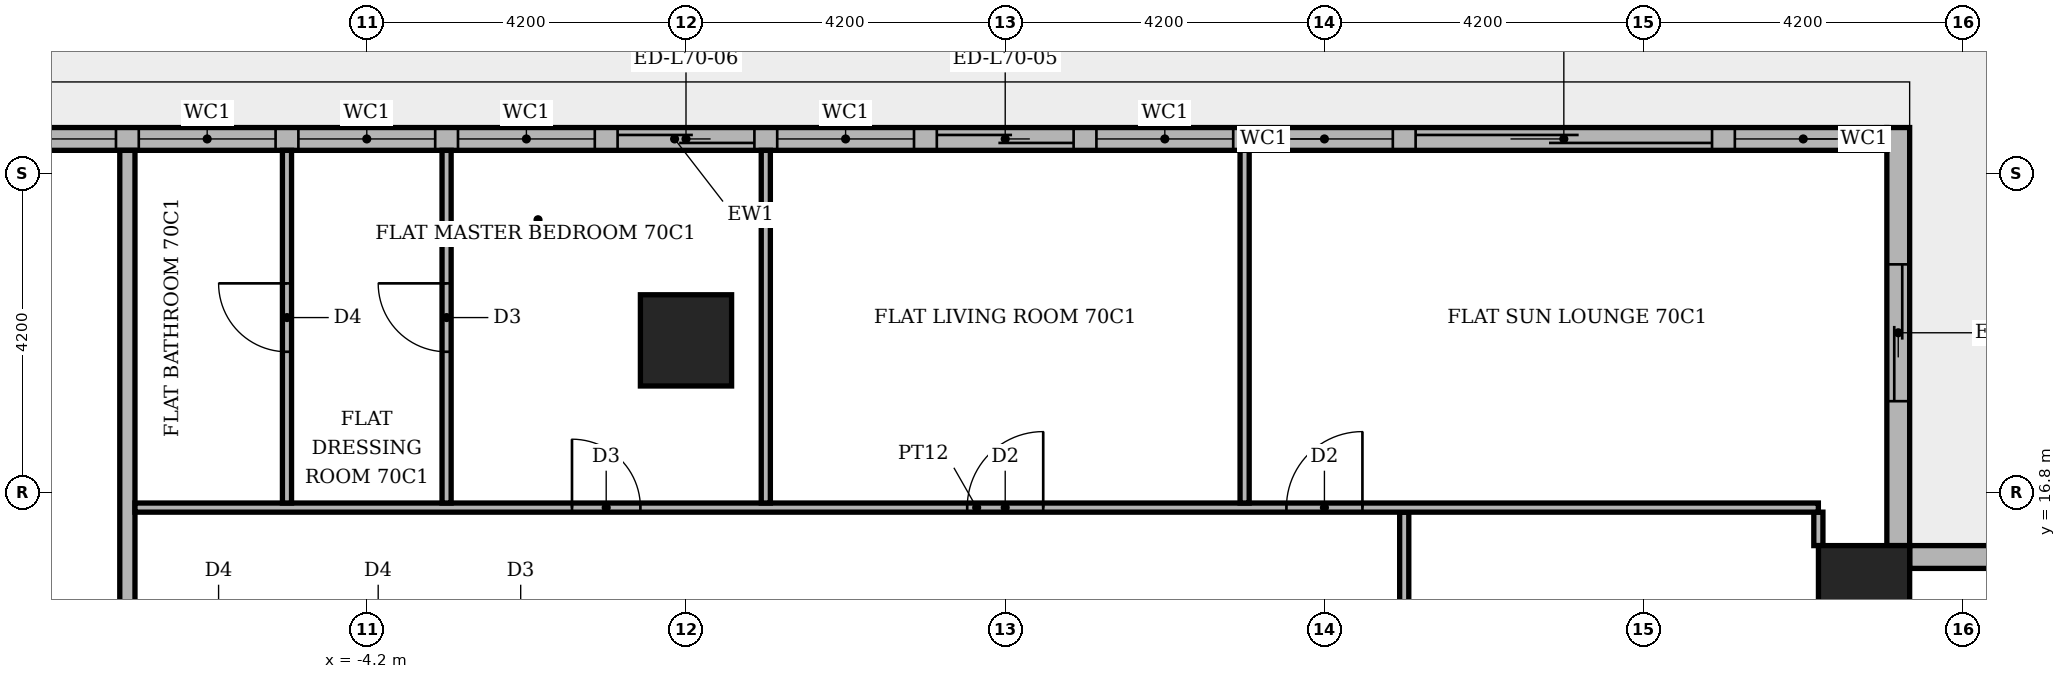
"""IFC4 building model, lengths in metres.
Left out: names, types, materials, properties, quantities, classifications, styles, units other than length and angle.
Written with IfcOpenShell. Run it as: python <this file> out.ifc"""

import sys

from ifc_helpers import new_model, si_unit, direction, frame, frame_2d, origin, origin_2d, place, context, subcontext, project, spatial, rectangle, extrude, element, fill, save


model = new_model("IFC4")
c1 = context("Model", 3, precision=1e-05, world=origin(), true_north=direction((0.0, 1.0)))
c2 = subcontext(c1, "Body", "Model", "MODEL_VIEW")
j1 = project(units=[si_unit("LENGTHUNIT", "METRE"), si_unit("PLANEANGLEUNIT", "RADIAN")], contexts=[c1])
p1 = place(None, origin())
s1 = spatial("IfcSite", under=j1, at=p1, CompositionType="ELEMENT")
p2 = place(p1, origin())
s2 = spatial("IfcBuilding", under=s1, at=p2, CompositionType="ELEMENT")
p3 = place(p2, frame((0.0, 0.0, 292.8)))
s3 = spatial("IfcBuildingStorey", under=s2, at=p3, CompositionType="ELEMENT", Elevation=292.8)
for number, where, z_axis, x_axis in (
    (1, (15.5, 15.5, -0.35), (0.0, 0.0, 1.0), (1.0, 0.0, 0.0)),
    (2, (0.0, 18.8, -0.35), (0.0, 0.0, 1.0), (1.0, 0.0, 0.0)),
):
    element("IfcColumn", number, at=place(p3, frame(where, z_axis=z_axis, x_axis=x_axis)), inside=s3, PredefinedType="COLUMN", context=c2, shape_type="SweptSolid", body=[
        extrude(rectangle(XDim=1.2, YDim=1.2, at=origin_2d()), origin(), (0.0, 0.0, 1.0), 4.25),
    ])
p4 = place(p3, frame((21.3, 15.95, 0.0), z_axis=(0.0, 0.0, 1.0), x_axis=(-1.0, 0.0, 0.0)))
e3 = element("IfcWall", 3, at=p4, inside=s3, PredefinedType="STANDARD", context=c2, shape_type="SweptSolid", body=[
    extrude(rectangle(XDim=5.2, YDim=0.3, at=frame_2d((2.6, 0.0))), origin(), (0.0, 0.0, 1.0), 3.55),
])
p5 = place(p4, frame((1.5, 0.0, 0.6)))
e4 = element("IfcOpeningElement", 4, at=p5, cuts=e3, PredefinedType="OPENING", context=c2, shape_type="SweptSolid", body=[
    extrude(rectangle(XDim=1.8, YDim=2.4, at=frame_2d((0.9, 1.2))), frame((0.0, 0.16, 0.0), z_axis=(0.0, -1.0, 0.0), x_axis=(1.0, 0.0, 0.0)), (0.0, 0.0, 1.0), 0.32),
])
p6 = place(p3, frame((15.95, 16.1, 0.0), z_axis=(0.0, 0.0, 1.0), x_axis=(0.0, 1.0, 0.0)))
e5 = element("IfcWall", 5, at=p6, inside=s3, PredefinedType="STANDARD", context=c2, shape_type="SweptSolid", body=[
    extrude(rectangle(XDim=5.5, YDim=0.3, at=frame_2d((2.75, 0.0))), origin(), (0.0, 0.0, 1.0), 3.55),
])
p7 = place(p6, frame((1.9, 0.0, 0.0)))
e6 = element("IfcOpeningElement", 6, at=p7, cuts=e5, PredefinedType="OPENING", context=c2, shape_type="SweptSolid", body=[
    extrude(rectangle(XDim=1.8, YDim=2.4, at=frame_2d((0.9, 1.2))), frame((0.0, 0.16, 0.0), z_axis=(0.0, -1.0, 0.0), x_axis=(1.0, 0.0, 0.0)), (0.0, 0.0, 1.0), 0.32),
])
p8 = place(p3, frame((15.8, 21.45, 0.0), z_axis=(0.0, 0.0, 1.0), x_axis=(-1.0, 0.0, 0.0)))
e7 = element("IfcWall", 7, at=p8, inside=s3, PredefinedType="STANDARD", context=c2, shape_type="SweptSolid", body=[
    extrude(rectangle(XDim=31.9, YDim=0.3, at=frame_2d((15.95, 0.0))), origin(), (0.0, 0.0, 1.0), 3.55),
])
p9 = place(p8, frame((0.2, 0.0, 0.6)))
e8 = element("IfcOpeningElement", 8, at=p9, cuts=e7, PredefinedType="OPENING", context=c2, shape_type="SweptSolid", body=[
    extrude(rectangle(XDim=1.8, YDim=2.4, at=frame_2d((0.9, 1.2))), frame((0.0, 0.16, 0.0), z_axis=(0.0, -1.0, 0.0), x_axis=(1.0, 0.0, 0.0)), (0.0, 0.0, 1.0), 0.32),
])
p10 = place(p8, frame((2.3, 0.0, 0.0)))
e9 = element("IfcOpeningElement", 9, at=p10, cuts=e7, PredefinedType="OPENING", context=c2, shape_type="SweptSolid", body=[
    extrude(rectangle(XDim=3.9, YDim=2.4, at=frame_2d((1.95, 1.2))), frame((0.0, 0.16, 0.0), z_axis=(0.0, -1.0, 0.0), x_axis=(1.0, 0.0, 0.0)), (0.0, 0.0, 1.0), 0.32),
])
p11 = place(p8, frame((6.5, 0.0, 0.6)))
e10 = element("IfcOpeningElement", 10, at=p11, cuts=e7, PredefinedType="OPENING", context=c2, shape_type="SweptSolid", body=[
    extrude(rectangle(XDim=1.8, YDim=2.4, at=frame_2d((0.9, 1.2))), frame((0.0, 0.16, 0.0), z_axis=(0.0, -1.0, 0.0), x_axis=(1.0, 0.0, 0.0)), (0.0, 0.0, 1.0), 0.32),
])
p12 = place(p8, frame((8.6, 0.0, 0.6)))
e11 = element("IfcOpeningElement", 11, at=p12, cuts=e7, PredefinedType="OPENING", context=c2, shape_type="SweptSolid", body=[
    extrude(rectangle(XDim=1.8, YDim=2.4, at=frame_2d((0.9, 1.2))), frame((0.0, 0.16, 0.0), z_axis=(0.0, -1.0, 0.0), x_axis=(1.0, 0.0, 0.0)), (0.0, 0.0, 1.0), 0.32),
])
p13 = place(p8, frame((10.7, 0.0, 0.0)))
e12 = element("IfcOpeningElement", 12, at=p13, cuts=e7, PredefinedType="OPENING", context=c2, shape_type="SweptSolid", body=[
    extrude(rectangle(XDim=1.8, YDim=2.4, at=frame_2d((0.9, 1.2))), frame((0.0, 0.16, 0.0), z_axis=(0.0, -1.0, 0.0), x_axis=(1.0, 0.0, 0.0)), (0.0, 0.0, 1.0), 0.32),
])
p14 = place(p8, frame((12.8, 0.0, 0.6)))
e13 = element("IfcOpeningElement", 13, at=p14, cuts=e7, PredefinedType="OPENING", context=c2, shape_type="SweptSolid", body=[
    extrude(rectangle(XDim=1.8, YDim=2.4, at=frame_2d((0.9, 1.2))), frame((0.0, 0.16, 0.0), z_axis=(0.0, -1.0, 0.0), x_axis=(1.0, 0.0, 0.0)), (0.0, 0.0, 1.0), 0.32),
])
p15 = place(p8, frame((14.9, 0.0, 0.0)))
e14 = element("IfcOpeningElement", 14, at=p15, cuts=e7, PredefinedType="OPENING", context=c2, shape_type="SweptSolid", body=[
    extrude(rectangle(XDim=1.8, YDim=2.4, at=frame_2d((0.9, 1.2))), frame((0.0, 0.16, 0.0), z_axis=(0.0, -1.0, 0.0), x_axis=(1.0, 0.0, 0.0)), (0.0, 0.0, 1.0), 0.32),
])
p16 = place(p8, frame((17.0, 0.0, 0.6)))
e15 = element("IfcOpeningElement", 15, at=p16, cuts=e7, PredefinedType="OPENING", context=c2, shape_type="SweptSolid", body=[
    extrude(rectangle(XDim=1.8, YDim=2.4, at=frame_2d((0.9, 1.2))), frame((0.0, 0.16, 0.0), z_axis=(0.0, -1.0, 0.0), x_axis=(1.0, 0.0, 0.0)), (0.0, 0.0, 1.0), 0.32),
])
p17 = place(p8, frame((19.1, 0.0, 0.6)))
e16 = element("IfcOpeningElement", 16, at=p17, cuts=e7, PredefinedType="OPENING", context=c2, shape_type="SweptSolid", body=[
    extrude(rectangle(XDim=1.8, YDim=2.4, at=frame_2d((0.9, 1.2))), frame((0.0, 0.16, 0.0), z_axis=(0.0, -1.0, 0.0), x_axis=(1.0, 0.0, 0.0)), (0.0, 0.0, 1.0), 0.32),
])
p18 = place(p8, frame((21.2, 0.0, 0.6)))
e17 = element("IfcOpeningElement", 17, at=p18, cuts=e7, PredefinedType="OPENING", context=c2, shape_type="SweptSolid", body=[
    extrude(rectangle(XDim=1.8, YDim=2.4, at=frame_2d((0.9, 1.2))), frame((0.0, 0.16, 0.0), z_axis=(0.0, -1.0, 0.0), x_axis=(1.0, 0.0, 0.0)), (0.0, 0.0, 1.0), 0.32),
])
p19 = place(p8, frame((23.3, 0.0, 0.6)))
e18 = element("IfcOpeningElement", 18, at=p19, cuts=e7, PredefinedType="OPENING", context=c2, shape_type="SweptSolid", body=[
    extrude(rectangle(XDim=6.0, YDim=2.4, at=frame_2d((3.0, 1.2))), frame((0.0, 0.16, 0.0), z_axis=(0.0, -1.0, 0.0), x_axis=(1.0, 0.0, 0.0)), (0.0, 0.0, 1.0), 0.32),
])
p20 = place(p8, frame((29.6, 0.0, 0.6)))
e19 = element("IfcOpeningElement", 19, at=p20, cuts=e7, PredefinedType="OPENING", context=c2, shape_type="SweptSolid", body=[
    extrude(rectangle(XDim=1.8, YDim=2.4, at=frame_2d((0.9, 1.2))), frame((0.0, 0.16, 0.0), z_axis=(0.0, -1.0, 0.0), x_axis=(1.0, 0.0, 0.0)), (0.0, 0.0, 1.0), 0.32),
])
p21 = place(p3, frame((-7.35, 7.45, 0.0), z_axis=(0.0, 0.0, 1.0), x_axis=(0.0, 1.0, 0.0)))
e20 = element("IfcWall", 20, at=p21, inside=s3, PredefinedType="PARTITIONING", context=c2, shape_type="SweptSolid", body=[
    extrude(rectangle(XDim=13.85, YDim=0.2, at=frame_2d((6.925, 0.0))), origin(), (0.0, 0.0, 1.0), 3.55),
])
p22 = place(p3, frame((9.45, 7.45, 0.0), z_axis=(0.0, 0.0, 1.0), x_axis=(0.0, 1.0, 0.0)))
e21 = element("IfcWall", 21, at=p22, inside=s3, PredefinedType="PARTITIONING", context=c2, shape_type="SweptSolid", body=[
    extrude(rectangle(XDim=9.09, YDim=0.12, at=frame_2d((4.545, 0.0))), origin(), (0.0, 0.0, 1.0), 3.55),
])
p23 = place(p22, frame((4.075, 0.0, 0.0)))
e22 = element("IfcOpeningElement", 22, at=p23, cuts=e21, PredefinedType="OPENING", context=c2, shape_type="SweptSolid", body=[
    extrude(rectangle(XDim=0.9, YDim=2.1, at=frame_2d((0.45, 1.05))), frame((0.0, 0.07, 0.0), z_axis=(0.0, -1.0, 0.0), x_axis=(1.0, 0.0, 0.0)), (0.0, 0.0, 1.0), 0.14),
])
p24 = place(p3, frame((14.899, 16.1, 0.0), z_axis=(0.0, 0.0, 1.0), x_axis=(0.0, 1.0, 0.0)))
e23 = element("IfcWall", 23, at=p24, inside=s3, PredefinedType="PARTITIONING", context=c2, shape_type="SweptSolid", body=[
    extrude(rectangle(XDim=0.44, YDim=0.12, at=frame_2d((0.22, 0.0))), origin(), (0.0, 0.0, 1.0), 3.55),
])
p25 = place(p3, frame((-7.25, 16.6, 0.0), z_axis=(0.0, 0.0, 1.0), x_axis=(1.0, 0.0, 0.0)))
e24 = element("IfcWall", 24, at=p25, inside=s3, PredefinedType="PARTITIONING", context=c2, shape_type="SweptSolid", body=[
    extrude(rectangle(XDim=22.149, YDim=0.12, at=frame_2d((11.074, 0.0))), origin(), (0.0, 0.0, 1.0), 3.55),
])
p26 = place(p25, frame((15.15, 0.0, 0.0)))
e25 = element("IfcOpeningElement", 25, at=p26, cuts=e24, PredefinedType="OPENING", context=c2, shape_type="SweptSolid", body=[
    extrude(rectangle(XDim=1.0, YDim=2.1, at=frame_2d((0.5, 1.05))), frame((0.0, 0.07, 0.0), z_axis=(0.0, -1.0, 0.0), x_axis=(1.0, 0.0, 0.0)), (0.0, 0.0, 1.0), 0.14),
])
p27 = place(p25, frame((10.95, 0.0, 0.0)))
e26 = element("IfcOpeningElement", 26, at=p27, cuts=e24, PredefinedType="OPENING", context=c2, shape_type="SweptSolid", body=[
    extrude(rectangle(XDim=1.0, YDim=2.1, at=frame_2d((0.5, 1.05))), frame((0.0, 0.07, 0.0), z_axis=(0.0, -1.0, 0.0), x_axis=(1.0, 0.0, 0.0)), (0.0, 0.0, 1.0), 0.14),
])
p28 = place(p25, frame((5.75, 0.0, 0.0)))
e27 = element("IfcOpeningElement", 27, at=p28, cuts=e24, PredefinedType="OPENING", context=c2, shape_type="SweptSolid", body=[
    extrude(rectangle(XDim=0.9, YDim=2.1, at=frame_2d((0.45, 1.05))), frame((0.0, 0.07, 0.0), z_axis=(0.0, -1.0, 0.0), x_axis=(1.0, 0.0, 0.0)), (0.0, 0.0, 1.0), 0.14),
])
p29 = place(p3, frame((-5.25, 16.66, 0.0), z_axis=(0.0, 0.0, 1.0), x_axis=(0.0, 1.0, 0.0)))
e28 = element("IfcWall", 28, at=p29, inside=s3, PredefinedType="PARTITIONING", context=c2, shape_type="SweptSolid", body=[
    extrude(rectangle(XDim=4.64, YDim=0.12, at=frame_2d((2.32, 0.0))), origin(), (0.0, 0.0, 1.0), 3.55),
])
p30 = place(p29, frame((1.99, 0.0, 0.0)))
e29 = element("IfcOpeningElement", 29, at=p30, cuts=e28, PredefinedType="OPENING", context=c2, shape_type="SweptSolid", body=[
    extrude(rectangle(XDim=0.9, YDim=2.1, at=frame_2d((0.45, 1.05))), frame((0.0, 0.07, 0.0), z_axis=(0.0, -1.0, 0.0), x_axis=(1.0, 0.0, 0.0)), (0.0, 0.0, 1.0), 0.14),
])
p31 = place(p3, frame((-3.15, 16.66, 0.0), z_axis=(0.0, 0.0, 1.0), x_axis=(0.0, 1.0, 0.0)))
e30 = element("IfcWall", 30, at=p31, inside=s3, PredefinedType="PARTITIONING", context=c2, shape_type="SweptSolid", body=[
    extrude(rectangle(XDim=4.64, YDim=0.12, at=frame_2d((2.32, 0.0))), origin(), (0.0, 0.0, 1.0), 3.55),
])
p32 = place(p31, frame((1.99, 0.0, 0.0)))
e31 = element("IfcOpeningElement", 31, at=p32, cuts=e30, PredefinedType="OPENING", context=c2, shape_type="SweptSolid", body=[
    extrude(rectangle(XDim=0.9, YDim=2.1, at=frame_2d((0.45, 1.05))), frame((0.0, 0.07, 0.0), z_axis=(0.0, -1.0, 0.0), x_axis=(1.0, 0.0, 0.0)), (0.0, 0.0, 1.0), 0.14),
])
for number, where, z_axis, x_axis in (
    (32, (1.05, 16.66, 0.0), (0.0, 0.0, 1.0), (0.0, 1.0, 0.0)),
    (33, (7.35, 16.66, 0.0), (0.0, 0.0, 1.0), (0.0, 1.0, 0.0)),
):
    element("IfcWall", number, at=place(p3, frame(where, z_axis=z_axis, x_axis=x_axis)), inside=s3, PredefinedType="PARTITIONING", context=c2, shape_type="SweptSolid", body=[
        extrude(rectangle(XDim=4.64, YDim=0.12, at=frame_2d((2.32, 0.0))), origin(), (0.0, 0.0, 1.0), 3.55),
    ])
p33 = place(p7, origin())
e34 = element("IfcDoor", 34, at=p33, inside=s3, OperationType="SLIDING_TO_LEFT", PredefinedType="DOOR", context=c2, shape_type="SweptSolid", body=[
    extrude(rectangle(XDim=1.8, YDim=2.4, at=frame_2d((0.9, 1.2))), frame((0.0, 0.025, 0.0), z_axis=(0.0, -1.0, 0.0), x_axis=(1.0, 0.0, 0.0)), (0.0, 0.0, 1.0), 0.05),
])
fill(e6, e34)
p34 = place(p9, origin())
e35 = element("IfcWindow", 35, at=p34, inside=s3, PartitioningType="SINGLE_PANEL", PredefinedType="WINDOW", context=c2, shape_type="SweptSolid", body=[
    extrude(rectangle(XDim=1.8, YDim=2.4, at=frame_2d((0.9, 1.2))), frame((0.0, 0.03, 0.0), z_axis=(0.0, -1.0, 0.0), x_axis=(1.0, 0.0, 0.0)), (0.0, 0.0, 1.0), 0.06),
])
fill(e8, e35)
p35 = place(p10, origin())
e36 = element("IfcDoor", 36, at=p35, inside=s3, OperationType="SLIDING_TO_RIGHT", PredefinedType="DOOR", context=c2, shape_type="SweptSolid", body=[
    extrude(rectangle(XDim=3.9, YDim=2.4, at=frame_2d((1.95, 1.2))), frame((0.0, 0.025, 0.0), z_axis=(0.0, -1.0, 0.0), x_axis=(1.0, 0.0, 0.0)), (0.0, 0.0, 1.0), 0.05),
])
fill(e9, e36)
p36 = place(p11, origin())
e37 = element("IfcWindow", 37, at=p36, inside=s3, PartitioningType="SINGLE_PANEL", PredefinedType="WINDOW", context=c2, shape_type="SweptSolid", body=[
    extrude(rectangle(XDim=1.8, YDim=2.4, at=frame_2d((0.9, 1.2))), frame((0.0, 0.03, 0.0), z_axis=(0.0, -1.0, 0.0), x_axis=(1.0, 0.0, 0.0)), (0.0, 0.0, 1.0), 0.06),
])
fill(e10, e37)
p37 = place(p12, origin())
e38 = element("IfcWindow", 38, at=p37, inside=s3, PartitioningType="SINGLE_PANEL", PredefinedType="WINDOW", context=c2, shape_type="SweptSolid", body=[
    extrude(rectangle(XDim=1.8, YDim=2.4, at=frame_2d((0.9, 1.2))), frame((0.0, 0.03, 0.0), z_axis=(0.0, -1.0, 0.0), x_axis=(1.0, 0.0, 0.0)), (0.0, 0.0, 1.0), 0.06),
])
fill(e11, e38)
p38 = place(p13, origin())
e39 = element("IfcDoor", 39, at=p38, inside=s3, OperationType="SLIDING_TO_LEFT", PredefinedType="DOOR", context=c2, shape_type="SweptSolid", body=[
    extrude(rectangle(XDim=1.8, YDim=2.4, at=frame_2d((0.9, 1.2))), frame((0.0, 0.025, 0.0), z_axis=(0.0, -1.0, 0.0), x_axis=(1.0, 0.0, 0.0)), (0.0, 0.0, 1.0), 0.05),
])
fill(e12, e39)
p39 = place(p14, origin())
e40 = element("IfcWindow", 40, at=p39, inside=s3, PartitioningType="SINGLE_PANEL", PredefinedType="WINDOW", context=c2, shape_type="SweptSolid", body=[
    extrude(rectangle(XDim=1.8, YDim=2.4, at=frame_2d((0.9, 1.2))), frame((0.0, 0.03, 0.0), z_axis=(0.0, -1.0, 0.0), x_axis=(1.0, 0.0, 0.0)), (0.0, 0.0, 1.0), 0.06),
])
fill(e13, e40)
p40 = place(p15, origin())
e41 = element("IfcDoor", 41, at=p40, inside=s3, OperationType="SLIDING_TO_LEFT", PredefinedType="DOOR", context=c2, shape_type="SweptSolid", body=[
    extrude(rectangle(XDim=1.8, YDim=2.4, at=frame_2d((0.9, 1.2))), frame((0.0, 0.025, 0.0), z_axis=(0.0, -1.0, 0.0), x_axis=(1.0, 0.0, 0.0)), (0.0, 0.0, 1.0), 0.05),
])
fill(e14, e41)
p41 = place(p16, origin())
e42 = element("IfcWindow", 42, at=p41, inside=s3, PartitioningType="SINGLE_PANEL", PredefinedType="WINDOW", context=c2, shape_type="SweptSolid", body=[
    extrude(rectangle(XDim=1.8, YDim=2.4, at=frame_2d((0.9, 1.2))), frame((0.0, 0.03, 0.0), z_axis=(0.0, -1.0, 0.0), x_axis=(1.0, 0.0, 0.0)), (0.0, 0.0, 1.0), 0.06),
])
fill(e15, e42)
p42 = place(p17, origin())
e43 = element("IfcWindow", 43, at=p42, inside=s3, PartitioningType="SINGLE_PANEL", PredefinedType="WINDOW", context=c2, shape_type="SweptSolid", body=[
    extrude(rectangle(XDim=1.8, YDim=2.4, at=frame_2d((0.9, 1.2))), frame((0.0, 0.03, 0.0), z_axis=(0.0, -1.0, 0.0), x_axis=(1.0, 0.0, 0.0)), (0.0, 0.0, 1.0), 0.06),
])
fill(e16, e43)
p43 = place(p18, origin())
e44 = element("IfcWindow", 44, at=p43, inside=s3, PartitioningType="SINGLE_PANEL", PredefinedType="WINDOW", context=c2, shape_type="SweptSolid", body=[
    extrude(rectangle(XDim=1.8, YDim=2.4, at=frame_2d((0.9, 1.2))), frame((0.0, 0.03, 0.0), z_axis=(0.0, -1.0, 0.0), x_axis=(1.0, 0.0, 0.0)), (0.0, 0.0, 1.0), 0.06),
])
fill(e17, e44)
p44 = place(p19, origin())
e45 = element("IfcWindow", 45, at=p44, inside=s3, PartitioningType="SINGLE_PANEL", PredefinedType="WINDOW", context=c2, shape_type="SweptSolid", body=[
    extrude(rectangle(XDim=6.0, YDim=2.4, at=frame_2d((3.0, 1.2))), frame((0.0, 0.03, 0.0), z_axis=(0.0, -1.0, 0.0), x_axis=(1.0, 0.0, 0.0)), (0.0, 0.0, 1.0), 0.06),
])
fill(e18, e45)
p45 = place(p26, origin())
e46 = element("IfcDoor", 46, at=p45, inside=s3, OperationType="SINGLE_SWING_RIGHT", PredefinedType="DOOR", context=c2, shape_type="SweptSolid", body=[
    extrude(rectangle(XDim=1.0, YDim=2.1, at=frame_2d((0.5, 1.05))), frame((0.0, 0.025, 0.0), z_axis=(0.0, -1.0, 0.0), x_axis=(1.0, 0.0, 0.0)), (0.0, 0.0, 1.0), 0.05),
])
fill(e25, e46)
p46 = place(p27, origin())
e47 = element("IfcDoor", 47, at=p46, inside=s3, OperationType="SINGLE_SWING_RIGHT", PredefinedType="DOOR", context=c2, shape_type="SweptSolid", body=[
    extrude(rectangle(XDim=1.0, YDim=2.1, at=frame_2d((0.5, 1.05))), frame((0.0, 0.025, 0.0), z_axis=(0.0, -1.0, 0.0), x_axis=(1.0, 0.0, 0.0)), (0.0, 0.0, 1.0), 0.05),
])
fill(e26, e47)
p47 = place(p28, origin())
e48 = element("IfcDoor", 48, at=p47, inside=s3, OperationType="SINGLE_SWING_LEFT", PredefinedType="DOOR", context=c2, shape_type="SweptSolid", body=[
    extrude(rectangle(XDim=0.9, YDim=2.1, at=frame_2d((0.45, 1.05))), frame((0.0, 0.025, 0.0), z_axis=(0.0, -1.0, 0.0), x_axis=(1.0, 0.0, 0.0)), (0.0, 0.0, 1.0), 0.05),
])
fill(e27, e48)
p48 = place(p32, origin())
e49 = element("IfcDoor", 49, at=p48, inside=s3, OperationType="SINGLE_SWING_RIGHT", PredefinedType="DOOR", context=c2, shape_type="SweptSolid", body=[
    extrude(rectangle(XDim=0.9, YDim=2.1, at=frame_2d((0.45, 1.05))), frame((0.0, 0.025, 0.0), z_axis=(0.0, -1.0, 0.0), x_axis=(1.0, 0.0, 0.0)), (0.0, 0.0, 1.0), 0.05),
])
fill(e31, e49)
p49 = place(p30, origin())
e50 = element("IfcDoor", 50, at=p49, inside=s3, OperationType="SINGLE_SWING_RIGHT", PredefinedType="DOOR", context=c2, shape_type="SweptSolid", body=[
    extrude(rectangle(XDim=0.9, YDim=2.1, at=frame_2d((0.45, 1.05))), frame((0.0, 0.025, 0.0), z_axis=(0.0, -1.0, 0.0), x_axis=(1.0, 0.0, 0.0)), (0.0, 0.0, 1.0), 0.05),
])
fill(e29, e50)
save(model, sys.argv[1])
